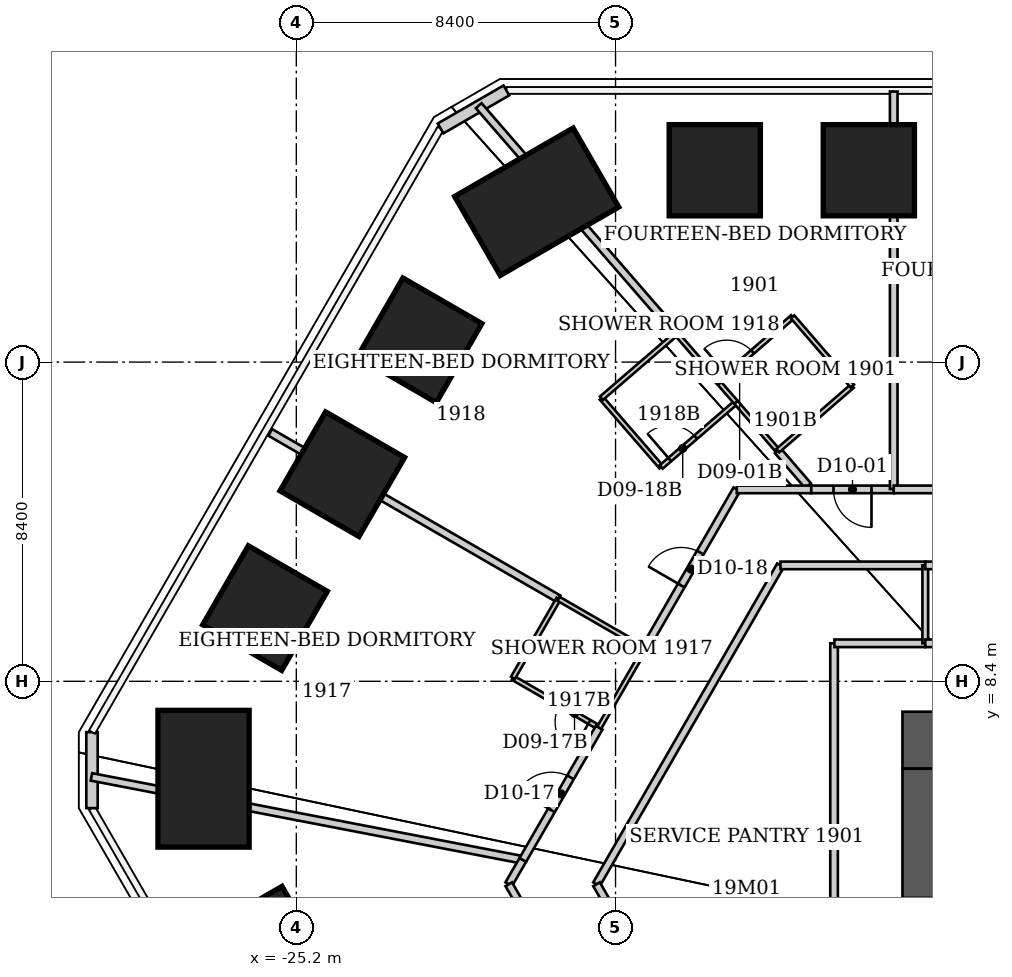
"""IFC4 building model, lengths in metres.
Left out: names, types, materials, properties, quantities, classifications, styles, units other than length and angle.
Written with IfcOpenShell. Run it as: python <this file> out.ifc"""

import sys

from ifc_helpers import new_model, si_unit, direction, frame, frame_2d, origin, origin_2d, place, context, subcontext, project, spatial, rectangle, extrude, element, fill, save


model = new_model("IFC4")
c1 = context("Model", 3, precision=1e-05, world=origin(), true_north=direction((0.0, 1.0)))
c2 = subcontext(c1, "Body", "Model", "MODEL_VIEW")
j1 = project(units=[si_unit("LENGTHUNIT", "METRE"), si_unit("PLANEANGLEUNIT", "RADIAN")], contexts=[c1])
p1 = place(None, origin())
s1 = spatial("IfcSite", under=j1, at=p1, CompositionType="ELEMENT")
p2 = place(p1, origin())
s2 = spatial("IfcBuilding", under=s1, at=p2, CompositionType="ELEMENT")
p3 = place(p2, frame((0.0, 0.0, 80.0)))
s3 = spatial("IfcBuildingStorey", under=s2, at=p3, CompositionType="ELEMENT", Elevation=80.0)
p4 = place(p3, frame((-14.189, 21.848, 0.0), z_axis=(0.0238126955, -0.036713913278, 0.999042063231), x_axis=(0.001457588232, 0.999325647249, 0.036689592354)))
e1 = element("IfcColumn", 1, at=p4, inside=s3, PredefinedType="COLUMN", context=c2, shape_type="SweptSolid", body=[
    extrude(rectangle(XDim=2.4, YDim=2.4, at=origin_2d()), origin(), (0.0, 0.0, 1.0), 3.804),
])
p5 = place(p3, frame((-10.135, 21.849, 0.0), z_axis=(0.017011430722, -0.036719012729, 0.999180827142), x_axis=(0.001112013962, 0.99932551115, 0.036705397281)))
e2 = element("IfcColumn", 2, at=p5, inside=s3, PredefinedType="COLUMN", context=c2, shape_type="SweptSolid", body=[
    extrude(rectangle(XDim=2.4, YDim=2.4, at=origin_2d()), origin(), (0.0, 0.0, 1.0), 3.803),
])
p6 = place(p3, frame((-26.016, 1.364, 0.0), z_axis=(0.043710081557, -0.002246479963, 0.99904173191), x_axis=(-0.864490436005, -0.501307983687, 0.036695933665)))
e3 = element("IfcColumn", 3, at=p6, inside=s3, PredefinedType="COLUMN", context=c2, shape_type="SweptSolid", body=[
    extrude(rectangle(XDim=2.4, YDim=2.4, at=origin_2d()), origin(), (0.0, 0.0, 1.0), 3.804),
])
p7 = place(p3, frame((-27.641, 5.836, 0.0), z_axis=(0.04678227982, -0.009882676395, 0.998856221386), x_axis=(-0.998905103639, -0.000352183695, 0.046781084758)))
e4 = element("IfcColumn", 4, at=p7, inside=s3, PredefinedType="COLUMN", context=c2, shape_type="SweptSolid", body=[
    extrude(rectangle(XDim=2.4, YDim=3.6, at=origin_2d()), origin(), (0.0, 0.0, 1.0), 3.804),
])
p8 = place(p3, frame((-26.024, 10.327, 0.0), z_axis=(0.043063214726, -0.017135437156, 0.998925390773), x_axis=(-0.864497674409, 0.500540860582, 0.045854310909)))
e5 = element("IfcColumn", 5, at=p8, inside=s3, PredefinedType="COLUMN", context=c2, shape_type="SweptSolid", body=[
    extrude(rectangle(XDim=2.4, YDim=2.4, at=origin_2d()), origin(), (0.0, 0.0, 1.0), 3.804),
])
p9 = place(p3, frame((-23.99, 13.851, 0.0), z_axis=(0.039726869437, -0.02291194247, 0.998947855865), x_axis=(-0.865344046472, 0.499075645542, 0.045860454239)))
e6 = element("IfcColumn", 6, at=p9, inside=s3, PredefinedType="COLUMN", context=c2, shape_type="SweptSolid", body=[
    extrude(rectangle(XDim=2.4, YDim=2.4, at=origin_2d()), origin(), (0.0, 0.0, 1.0), 3.804),
])
p10 = place(p3, frame((-21.956, 17.374, 0.0), z_axis=(0.036324594823, -0.028751622758, 0.998926357646), x_axis=(-0.865203233746, 0.499322177845, 0.045833688787)))
e7 = element("IfcColumn", 7, at=p10, inside=s3, PredefinedType="COLUMN", context=c2, shape_type="SweptSolid", body=[
    extrude(rectangle(XDim=2.4, YDim=2.4, at=origin_2d()), origin(), (0.0, 0.0, 1.0), 3.804),
])
p11 = place(p3, frame((-18.875, 21.02, 0.0), z_axis=(0.031958280822, -0.035551983084, 0.998856708836), x_axis=(-0.499520046627, 0.86503883454, 0.046771120948)))
e8 = element("IfcColumn", 8, at=p11, inside=s3, PredefinedType="COLUMN", context=c2, shape_type="SweptSolid", body=[
    extrude(rectangle(XDim=2.4, YDim=3.6, at=origin_2d()), origin(), (0.0, 0.0, 1.0), 3.804),
])
p12 = place(p3, frame((-9.25, 6.85, 0.0), z_axis=(0.0, 0.0, 1.0), x_axis=(1.0, 0.0, 0.0)))
e9 = element("IfcWall", 9, at=p12, inside=s3, PredefinedType="SHEAR", context=c2, shape_type="SweptSolid", body=[
    extrude(rectangle(XDim=18.5, YDim=1.5, at=frame_2d((9.25, 0.0))), origin(), (0.0, 0.0, 1.0), 3.8),
])
p13 = place(p3, frame((-8.5, -9.2, 0.0), z_axis=(0.0, 0.0, 1.0), x_axis=(0.0, 1.0, 0.0)))
e10 = element("IfcWall", 10, at=p13, inside=s3, PredefinedType="SHEAR", context=c2, shape_type="SweptSolid", body=[
    extrude(rectangle(XDim=15.3, YDim=1.5, at=frame_2d((7.65, 0.0))), origin(), (0.0, 0.0, 1.0), 3.8),
])
p14 = place(p13, frame((10.7, 0.0, 0.0)))
e11 = element("IfcOpeningElement", 11, at=p14, cuts=e10, PredefinedType="OPENING", context=c2, shape_type="SweptSolid", body=[
    extrude(rectangle(XDim=1.2, YDim=2.2, at=frame_2d((0.6, 1.1))), frame((0.0, 0.75, 0.0), z_axis=(0.0, -1.0, 0.0), x_axis=(1.0, 0.0, 0.0)), (0.0, 0.0, 1.0), 1.5),
])
for number, where, z_axis, x_axis in (
    (12, (-30.576, 5.062, 0.0), (0.0, 0.0, 1.0), (0.0, 1.0, 0.0)),
    (13, (-21.404, 22.949, 0.0), (0.0, 0.0, 1.0), (0.866, 0.5, 0.0)),
):
    element("IfcWall", number, at=place(p3, frame(where, z_axis=z_axis, x_axis=x_axis)), inside=s3, PredefinedType="SOLIDWALL", context=c2, shape_type="SweptSolid", body=[
        extrude(rectangle(XDim=2.0, YDim=0.3, at=frame_2d((1.0, 0.0))), origin(), (0.0, 0.0, 1.0), 3.64),
    ])
p15 = place(p3, frame((-30.591, 5.884, 0.0), z_axis=(0.0, 0.0, 1.0), x_axis=(0.981983289605, -0.188967772219, 0.0)))
e14 = element("IfcWall", 14, at=p15, inside=s3, PredefinedType="PARTITIONING", context=c2, shape_type="SweptSolid", body=[
    extrude(rectangle(XDim=11.509, YDim=0.2, at=frame_2d((5.754, 0.0))), origin(), (0.0, 0.0, 1.0), 3.64),
])
p16 = place(p3, frame((-25.886, 14.95, 0.0), z_axis=(0.0, 0.0, 1.0), x_axis=(0.866018495177, -0.500011965869, 0.0)))
e15 = element("IfcWall", 15, at=p16, inside=s3, PredefinedType="PARTITIONING", context=c2, shape_type="SweptSolid", body=[
    extrude(rectangle(XDim=8.76, YDim=0.2, at=frame_2d((4.38, 0.0))), origin(), (0.0, 0.0, 1.0), 2.86),
])
p17 = place(p3, frame((-20.4, 23.547, 0.0), z_axis=(0.0, 0.0, 1.0), x_axis=(0.655343769788, -0.755330750996, 0.0)))
e16 = element("IfcWall", 16, at=p17, inside=s3, PredefinedType="PARTITIONING", context=c2, shape_type="SweptSolid", body=[
    extrude(rectangle(XDim=7.938, YDim=0.2, at=frame_2d((3.969, 0.0))), origin(), (0.0, 0.0, 1.0), 3.64),
])
p18 = place(p3, frame((-19.61, 3.06, 0.0), z_axis=(0.0, 0.0, 1.0), x_axis=(0.50068472101, 0.865629718844, 0.0)))
e17 = element("IfcWall", 17, at=p18, inside=s3, PredefinedType="PARTITIONING", context=c2, shape_type="SweptSolid", body=[
    extrude(rectangle(XDim=0.739, YDim=0.2, at=frame_2d((0.37, 0.0))), origin(), (0.0, 0.0, 1.0), 3.64),
])
p19 = place(p3, frame((-19.61, 3.06, 0.0), z_axis=(0.0, 0.0, 1.0), x_axis=(0.499983910424, -0.866034692906, 0.0)))
e18 = element("IfcWall", 18, at=p19, inside=s3, PredefinedType="PARTITIONING", context=c2, shape_type="SweptSolid", body=[
    extrude(rectangle(XDim=5.901, YDim=0.2, at=frame_2d((2.95, 0.0))), origin(), (0.0, 0.0, 1.0), 3.64),
])
p20 = place(p19, frame((2.15, 0.0, 0.0)))
e19 = element("IfcOpeningElement", 19, at=p20, cuts=e18, PredefinedType="OPENING", context=c2, shape_type="SweptSolid", body=[
    extrude(rectangle(XDim=1.0, YDim=2.13, at=frame_2d((0.5, 1.065))), frame((0.0, 0.1, 0.0), z_axis=(0.0, -1.0, 0.0), x_axis=(1.0, 0.0, 0.0)), (0.0, 0.0, 1.0), 0.2),
])
p21 = place(p3, frame((-19.5, 8.49, 0.0), z_axis=(0.0, 0.0, 1.0), x_axis=(0.866114241029, -0.499846097802, 0.0)))
e20 = element("IfcWall", 20, at=p21, inside=s3, PredefinedType="PARTITIONING", context=c2, shape_type="SweptSolid", body=[
    extrude(rectangle(XDim=2.621, YDim=0.12, at=frame_2d((1.311, 0.0))), origin(), (0.0, 0.0, 1.0), 3.64),
])
p22 = place(p21, frame((1.421, 0.0, 0.0)))
e21 = element("IfcOpeningElement", 21, at=p22, cuts=e20, PredefinedType="OPENING", context=c2, shape_type="SweptSolid", body=[
    extrude(rectangle(XDim=0.9, YDim=2.03, at=frame_2d((0.45, 1.015))), frame((0.0, 0.06, 0.0), z_axis=(0.0, -1.0, 0.0), x_axis=(1.0, 0.0, 0.0)), (0.0, 0.0, 1.0), 0.12),
])
p23 = place(p3, frame((-19.24, 3.7, 0.0), z_axis=(0.0, 0.0, 1.0), x_axis=(0.500157149565, 0.865934654428, 0.0)))
e22 = element("IfcWall", 22, at=p23, inside=s3, PredefinedType="PARTITIONING", context=c2, shape_type="SweptSolid", body=[
    extrude(rectangle(XDim=4.019, YDim=0.2, at=frame_2d((2.009, 0.0))), origin(), (0.0, 0.0, 1.0), 3.64),
])
p24 = place(p23, frame((1.51, 0.0, 0.0)))
e23 = element("IfcOpeningElement", 23, at=p24, cuts=e22, PredefinedType="OPENING", context=c2, shape_type="SweptSolid", body=[
    extrude(rectangle(XDim=1.0, YDim=2.13, at=frame_2d((0.5, 1.065))), frame((0.0, 0.1, 0.0), z_axis=(0.0, -1.0, 0.0), x_axis=(1.0, 0.0, 0.0)), (0.0, 0.0, 1.0), 0.2),
])
p25 = place(p3, frame((-18.3, 10.57, 0.0), z_axis=(0.0, 0.0, 1.0), x_axis=(-0.499693115345, -0.866202511239, 0.0)))
e24 = element("IfcWall", 24, at=p25, inside=s3, PredefinedType="PARTITIONING", context=c2, shape_type="SweptSolid", body=[
    extrude(rectangle(XDim=2.401, YDim=0.12, at=frame_2d((1.201, 0.0))), origin(), (0.0, 0.0, 1.0), 3.64),
])
p26 = place(p3, frame((-18.3, 10.57, 0.0), z_axis=(0.0, 0.0, 1.0), x_axis=(0.866114241029, -0.499846097802, 0.0)))
e25 = element("IfcWall", 25, at=p26, inside=s3, PredefinedType="PARTITIONING", context=c2, shape_type="SweptSolid", body=[
    extrude(rectangle(XDim=2.621, YDim=0.12, at=frame_2d((1.311, 0.0))), origin(), (0.0, 0.0, 1.0), 2.86),
])
p27 = place(p3, frame((-17.3, 3.06, 0.0), z_axis=(0.0, 0.0, 1.0), x_axis=(0.499704269421, 0.866196076603, 0.0)))
e26 = element("IfcWall", 26, at=p27, inside=s3, PredefinedType="PARTITIONING", context=c2, shape_type="SweptSolid", body=[
    extrude(rectangle(XDim=9.686, YDim=0.2, at=frame_2d((4.843, 0.0))), origin(), (0.0, 0.0, 1.0), 3.64),
])
p28 = place(p3, frame((-17.23, 7.18, 0.0), z_axis=(0.0, 0.0, 1.0), x_axis=(0.500009943768, 0.866019662671, 0.0)))
e27 = element("IfcWall", 27, at=p28, inside=s3, PredefinedType="PARTITIONING", context=c2, shape_type="SweptSolid", body=[
    extrude(rectangle(XDim=2.401, YDim=0.12, at=frame_2d((1.201, 0.0))), origin(), (0.0, 0.0, 1.0), 3.64),
])
p29 = place(p3, frame((-17.17, 15.85, 0.0), z_axis=(0.0, 0.0, 1.0), x_axis=(0.655194291402, -0.755460416245, 0.0)))
e28 = element("IfcWall", 28, at=p29, inside=s3, PredefinedType="PARTITIONING", context=c2, shape_type="SweptSolid", body=[
    extrude(rectangle(XDim=2.396, YDim=0.12, at=frame_2d((1.198, 0.0))), origin(), (0.0, 0.0, 1.0), 3.64),
])
p30 = place(p3, frame((-16.029, 9.26, 0.0), z_axis=(0.0, 0.0, 1.0), x_axis=(0.499975779801, 0.866039386871, 0.0)))
e29 = element("IfcWall", 29, at=p30, inside=s3, PredefinedType="PARTITIONING", context=c2, shape_type="SweptSolid", body=[
    extrude(rectangle(XDim=4.839, YDim=0.2, at=frame_2d((2.419, 0.0))), origin(), (0.0, 0.0, 1.0), 3.64),
])
p31 = place(p30, frame((1.919, 0.0, 0.0)))
e30 = element("IfcOpeningElement", 30, at=p31, cuts=e29, PredefinedType="OPENING", context=c2, shape_type="SweptSolid", body=[
    extrude(rectangle(XDim=1.0, YDim=2.13, at=frame_2d((0.5, 1.065))), frame((0.0, 0.1, 0.0), z_axis=(0.0, -1.0, 0.0), x_axis=(1.0, 0.0, 0.0)), (0.0, 0.0, 1.0), 0.2),
])
p32 = place(p3, frame((-15.6, 14.04, 0.0), z_axis=(0.0, 0.0, 1.0), x_axis=(0.757126702698, 0.653268058351, 0.0)))
e31 = element("IfcWall", 31, at=p32, inside=s3, PredefinedType="PARTITIONING", context=c2, shape_type="SweptSolid", body=[
    extrude(rectangle(XDim=2.602, YDim=0.12, at=frame_2d((1.301, 0.0))), origin(), (0.0, 0.0, 1.0), 3.64),
])
p33 = place(p32, frame((0.3, 0.0, 0.0)))
e32 = element("IfcOpeningElement", 32, at=p33, cuts=e31, PredefinedType="OPENING", context=c2, shape_type="SweptSolid", body=[
    extrude(rectangle(XDim=0.9, YDim=2.03, at=frame_2d((0.45, 1.015))), frame((0.0, 0.06, 0.0), z_axis=(0.0, -1.0, 0.0), x_axis=(1.0, 0.0, 0.0)), (0.0, 0.0, 1.0), 0.12),
])
p34 = place(p3, frame((-15.2, 17.55, 0.0), z_axis=(0.0, 0.0, 1.0), x_axis=(-0.757086659925, -0.653314464377, 0.0)))
e33 = element("IfcWall", 33, at=p34, inside=s3, PredefinedType="PARTITIONING", context=c2, shape_type="SweptSolid", body=[
    extrude(rectangle(XDim=2.602, YDim=0.12, at=frame_2d((1.301, 0.0))), origin(), (0.0, 0.0, 1.0), 3.64),
])
p35 = place(p3, frame((-15.2, 17.55, 0.0), z_axis=(0.0, 0.0, 1.0), x_axis=(0.654648343784, -0.755933559237, 0.0)))
e34 = element("IfcWall", 34, at=p35, inside=s3, PredefinedType="PARTITIONING", context=c2, shape_type="SweptSolid", body=[
    extrude(rectangle(XDim=1.68, YDim=0.12, at=frame_2d((0.84, 0.0))), origin(), (0.0, 0.0, 1.0), 3.64),
])
p36 = place(p3, frame((-14.1, 16.28, 0.0), z_axis=(0.0, 0.0, 1.0), x_axis=(0.656668163725, -0.754179635597, 0.0)))
e35 = element("IfcWall", 35, at=p36, inside=s3, PredefinedType="PARTITIONING", context=c2, shape_type="SweptSolid", body=[
    extrude(rectangle(XDim=0.716, YDim=0.12, at=frame_2d((0.358, 0.0))), origin(), (0.0, 0.0, 1.0), 3.64),
])
p37 = place(p3, frame((-13.63, 15.74, 0.0), z_axis=(0.0, 0.0, 1.0), x_axis=(0.654028355274, -0.756470032783, 0.0)))
e36 = element("IfcWall", 36, at=p37, inside=s3, PredefinedType="PARTITIONING", context=c2, shape_type="SweptSolid", body=[
    extrude(rectangle(XDim=1.68, YDim=0.12, at=frame_2d((0.84, 0.0))), origin(), (0.0, 0.0, 1.0), 3.64),
])
p38 = place(p3, frame((-12.531, 14.469, 0.0), z_axis=(0.0, 0.0, 1.0), x_axis=(0.654105410889, -0.756403405232, 0.0)))
e37 = element("IfcWall", 37, at=p38, inside=s3, PredefinedType="PARTITIONING", context=c2, shape_type="SweptSolid", body=[
    extrude(rectangle(XDim=1.217, YDim=0.2, at=frame_2d((0.608, 0.0))), origin(), (0.0, 0.0, 1.0), 3.64),
])
p39 = place(p3, frame((-12.53, 14.47, 0.0), z_axis=(0.0, 0.0, 1.0), x_axis=(0.755437535555, 0.655220672655, 0.0)))
e38 = element("IfcWall", 38, at=p39, inside=s3, PredefinedType="PARTITIONING", context=c2, shape_type="SweptSolid", body=[
    extrude(rectangle(XDim=2.594, YDim=0.12, at=frame_2d((1.297, 0.0))), origin(), (0.0, 0.0, 1.0), 3.64),
])
p40 = place(p3, frame((-12.46, 11.45, 0.0), z_axis=(0.0, 0.0, 1.0), x_axis=(1.0, 0.0, 0.0)))
e39 = element("IfcWall", 39, at=p40, inside=s3, PredefinedType="PARTITIONING", context=c2, shape_type="SweptSolid", body=[
    extrude(rectangle(XDim=3.81, YDim=0.2, at=frame_2d((1.905, 0.0))), origin(), (0.0, 0.0, 1.0), 3.64),
])
p41 = place(p3, frame((-12.14, 17.99, 0.0), z_axis=(0.0, 0.0, 1.0), x_axis=(-0.753570046386, -0.657367617996, 0.0)))
e40 = element("IfcWall", 40, at=p41, inside=s3, PredefinedType="PARTITIONING", context=c2, shape_type="SweptSolid", body=[
    extrude(rectangle(XDim=2.601, YDim=0.12, at=frame_2d((1.301, 0.0))), origin(), (0.0, 0.0, 1.0), 3.64),
])
p42 = place(p41, frame((1.401, 0.0, 0.0)))
e41 = element("IfcOpeningElement", 41, at=p42, cuts=e40, PredefinedType="OPENING", context=c2, shape_type="SweptSolid", body=[
    extrude(rectangle(XDim=0.9, YDim=2.03, at=frame_2d((0.45, 1.015))), frame((0.0, 0.06, 0.0), z_axis=(0.0, -1.0, 0.0), x_axis=(1.0, 0.0, 0.0)), (0.0, 0.0, 1.0), 0.12),
])
p43 = place(p3, frame((-11.65, 13.45, 0.0), z_axis=(0.0, 0.0, 1.0), x_axis=(-1.0, 0.0, 0.0)))
e42 = element("IfcWall", 42, at=p43, inside=s3, PredefinedType="PARTITIONING", context=c2, shape_type="SweptSolid", body=[
    extrude(rectangle(XDim=1.96, YDim=0.2, at=frame_2d((0.98, 0.0))), origin(), (0.0, 0.0, 1.0), 3.64),
])
p44 = place(p3, frame((-11.16, -7.57, 0.0), z_axis=(0.0, 0.0, 1.0), x_axis=(-0.500175206663, 0.865924224537, 0.0)))
e43 = element("IfcWall", 43, at=p44, inside=s3, PredefinedType="PARTITIONING", context=c2, shape_type="SweptSolid", body=[
    extrude(rectangle(XDim=12.275, YDim=0.2, at=frame_2d((6.138, 0.0))), origin(), (0.0, 0.0, 1.0), 3.64),
])
p45 = place(p3, frame((-11.05, 9.4, 0.0), z_axis=(0.0, 0.0, 1.0), x_axis=(0.0, -1.0, 0.0)))
e44 = element("IfcWall", 44, at=p45, inside=s3, PredefinedType="PARTITIONING", context=c2, shape_type="SweptSolid", body=[
    extrude(rectangle(XDim=17.16, YDim=0.2, at=frame_2d((8.58, 0.0))), origin(), (0.0, 0.0, 1.0), 3.64),
])
p46 = place(p45, frame((8.03, 0.0, 0.0)))
e45 = element("IfcOpeningElement", 45, at=p46, cuts=e44, PredefinedType="OPENING", context=c2, shape_type="SweptSolid", body=[
    extrude(rectangle(XDim=1.1, YDim=2.2, at=frame_2d((0.55, 1.1))), frame((0.0, 0.1, 0.0), z_axis=(0.0, -1.0, 0.0), x_axis=(1.0, 0.0, 0.0)), (0.0, 0.0, 1.0), 0.2),
])
p47 = place(p3, frame((-10.57, 16.17, 0.0), z_axis=(0.0, 0.0, 1.0), x_axis=(-0.653130488449, 0.757245379687, 0.0)))
e46 = element("IfcWall", 46, at=p47, inside=s3, PredefinedType="PARTITIONING", context=c2, shape_type="SweptSolid", body=[
    extrude(rectangle(XDim=2.404, YDim=0.12, at=frame_2d((1.202, 0.0))), origin(), (0.0, 0.0, 1.0), 3.64),
])
p48 = place(p3, frame((-9.48, 13.45, 0.0), z_axis=(0.0, 0.0, 1.0), x_axis=(-1.0, 0.0, 0.0)))
e47 = element("IfcWall", 47, at=p48, inside=s3, PredefinedType="PARTITIONING", context=c2, shape_type="SweptSolid", body=[
    extrude(rectangle(XDim=2.17, YDim=0.2, at=frame_2d((1.085, 0.0))), origin(), (0.0, 0.0, 1.0), 3.64),
])
p49 = place(p48, frame((0.585, 0.0, 0.0)))
e48 = element("IfcOpeningElement", 48, at=p49, cuts=e47, PredefinedType="OPENING", context=c2, shape_type="SweptSolid", body=[
    extrude(rectangle(XDim=1.0, YDim=2.13, at=frame_2d((0.5, 1.065))), frame((0.0, 0.1, 0.0), z_axis=(0.0, -1.0, 0.0), x_axis=(1.0, 0.0, 0.0)), (0.0, 0.0, 1.0), 0.2),
])
p50 = place(p3, frame((-9.48, 23.92, 0.0), z_axis=(0.0, 0.0, 1.0), x_axis=(0.0, -1.0, 0.0)))
e49 = element("IfcWall", 49, at=p50, inside=s3, PredefinedType="PARTITIONING", context=c2, shape_type="SweptSolid", body=[
    extrude(rectangle(XDim=10.46, YDim=0.2, at=frame_2d((5.23, 0.0))), origin(), (0.0, 0.0, 1.0), 3.64),
])
p51 = place(p3, frame((-8.65, 9.4, 0.0), z_axis=(0.0, 0.0, 1.0), x_axis=(-1.0, 0.0, 0.0)))
e50 = element("IfcWall", 50, at=p51, inside=s3, PredefinedType="PARTITIONING", context=c2, shape_type="SweptSolid", body=[
    extrude(rectangle(XDim=2.39, YDim=0.2, at=frame_2d((1.195, 0.0))), origin(), (0.0, 0.0, 1.0), 3.64),
])
p52 = place(p3, frame((-8.65, 11.45, 0.0), z_axis=(0.0, 0.0, 1.0), x_axis=(0.0, -1.0, 0.0)))
e51 = element("IfcWall", 51, at=p52, inside=s3, PredefinedType="PARTITIONING", context=c2, shape_type="SweptSolid", body=[
    extrude(rectangle(XDim=2.05, YDim=0.15, at=frame_2d((1.025, 0.0))), origin(), (0.0, 0.0, 1.0), 3.64),
])
p53 = place(p3, frame((-8.65, 11.45, 0.0), z_axis=(0.0, 0.0, 1.0), x_axis=(1.0, 0.0, 0.0)))
e52 = element("IfcWall", 52, at=p53, inside=s3, PredefinedType="PARTITIONING", context=c2, shape_type="SweptSolid", body=[
    extrude(rectangle(XDim=8.65, YDim=0.2, at=frame_2d((4.325, 0.0))), origin(), (0.0, 0.0, 1.0), 3.64),
])
p54 = place(p53, frame((3.775, 0.0, 0.0)))
e53 = element("IfcOpeningElement", 53, at=p54, cuts=e52, PredefinedType="OPENING", context=c2, shape_type="SweptSolid", body=[
    extrude(rectangle(XDim=1.1, YDim=2.2, at=frame_2d((0.55, 1.1))), frame((0.0, 0.1, 0.0), z_axis=(0.0, -1.0, 0.0), x_axis=(1.0, 0.0, 0.0)), (0.0, 0.0, 1.0), 0.2),
])
p55 = place(p3, frame((-4.64, 13.45, 0.0), z_axis=(0.0, 0.0, 1.0), x_axis=(-1.0, 0.0, 0.0)))
e54 = element("IfcWall", 54, at=p55, inside=s3, PredefinedType="PARTITIONING", context=c2, shape_type="SweptSolid", body=[
    extrude(rectangle(XDim=4.84, YDim=0.2, at=frame_2d((2.42, 0.0))), origin(), (0.0, 0.0, 1.0), 3.64),
])
p56 = place(p55, frame((1.92, 0.0, 0.0)))
e55 = element("IfcOpeningElement", 55, at=p56, cuts=e54, PredefinedType="OPENING", context=c2, shape_type="SweptSolid", body=[
    extrude(rectangle(XDim=1.0, YDim=2.13, at=frame_2d((0.5, 1.065))), frame((0.0, 0.1, 0.0), z_axis=(0.0, -1.0, 0.0), x_axis=(1.0, 0.0, 0.0)), (0.0, 0.0, 1.0), 0.2),
])
p57 = place(p3, frame((0.0, 9.4, 0.0), z_axis=(0.0, 0.0, 1.0), x_axis=(-1.0, 0.0, 0.0)))
e56 = element("IfcWall", 56, at=p57, inside=s3, PredefinedType="PARTITIONING", context=c2, shape_type="SweptSolid", body=[
    extrude(rectangle(XDim=8.65, YDim=0.2, at=frame_2d((4.325, 0.0))), origin(), (0.0, 0.0, 1.0), 3.64),
])
p58 = place(p49, origin())
e57 = element("IfcDoor", 57, at=p58, inside=s3, OperationType="SINGLE_SWING_LEFT", PredefinedType="DOOR", context=c2, shape_type="SweptSolid", body=[
    extrude(rectangle(XDim=1.0, YDim=2.13, at=frame_2d((0.5, 1.065))), frame((0.0, 0.025, 0.0), z_axis=(0.0, -1.0, 0.0), x_axis=(1.0, 0.0, 0.0)), (0.0, 0.0, 1.0), 0.05),
])
fill(e48, e57)
p59 = place(p42, origin())
e58 = element("IfcDoor", 58, at=p59, inside=s3, OperationType="SINGLE_SWING_RIGHT", PredefinedType="DOOR", context=c2, shape_type="SweptSolid", body=[
    extrude(rectangle(XDim=0.9, YDim=2.03, at=frame_2d((0.45, 1.015))), frame((0.0, 0.025, 0.0), z_axis=(0.0, -1.0, 0.0), x_axis=(1.0, 0.0, 0.0)), (0.0, 0.0, 1.0), 0.05),
])
fill(e41, e58)
p60 = place(p24, origin())
e59 = element("IfcDoor", 59, at=p60, inside=s3, OperationType="SINGLE_SWING_LEFT", PredefinedType="DOOR", context=c2, shape_type="SweptSolid", body=[
    extrude(rectangle(XDim=1.0, YDim=2.13, at=frame_2d((0.5, 1.065))), frame((0.0, 0.025, 0.0), z_axis=(0.0, -1.0, 0.0), x_axis=(1.0, 0.0, 0.0)), (0.0, 0.0, 1.0), 0.05),
])
fill(e23, e59)
p61 = place(p22, origin())
e60 = element("IfcDoor", 60, at=p61, inside=s3, OperationType="SINGLE_SWING_RIGHT", PredefinedType="DOOR", context=c2, shape_type="SweptSolid", body=[
    extrude(rectangle(XDim=0.9, YDim=2.03, at=frame_2d((0.45, 1.015))), frame((0.0, 0.025, 0.0), z_axis=(0.0, -1.0, 0.0), x_axis=(1.0, 0.0, 0.0)), (0.0, 0.0, 1.0), 0.05),
])
fill(e21, e60)
p62 = place(p31, origin())
e61 = element("IfcDoor", 61, at=p62, inside=s3, OperationType="SINGLE_SWING_LEFT", PredefinedType="DOOR", context=c2, shape_type="SweptSolid", body=[
    extrude(rectangle(XDim=1.0, YDim=2.13, at=frame_2d((0.5, 1.065))), frame((0.0, 0.025, 0.0), z_axis=(0.0, -1.0, 0.0), x_axis=(1.0, 0.0, 0.0)), (0.0, 0.0, 1.0), 0.05),
])
fill(e30, e61)
p63 = place(p33, origin())
e62 = element("IfcDoor", 62, at=p63, inside=s3, OperationType="SINGLE_SWING_LEFT", PredefinedType="DOOR", context=c2, shape_type="SweptSolid", body=[
    extrude(rectangle(XDim=0.9, YDim=2.03, at=frame_2d((0.45, 1.015))), frame((0.0, 0.025, 0.0), z_axis=(0.0, -1.0, 0.0), x_axis=(1.0, 0.0, 0.0)), (0.0, 0.0, 1.0), 0.05),
])
fill(e32, e62)
save(model, sys.argv[1])
